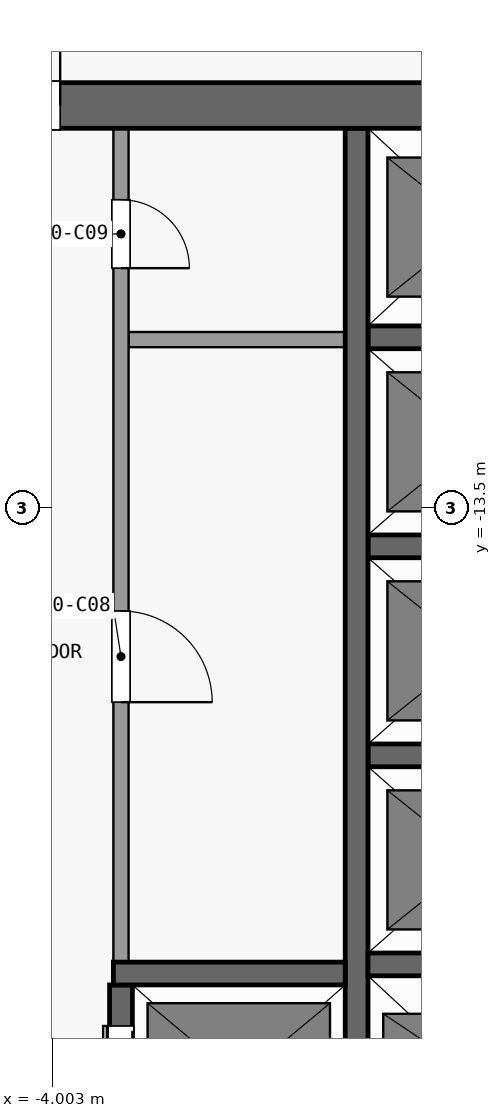
"""IFC4 building model, lengths in metres.
Left out: names, types, materials, properties, quantities, classifications, styles, units other than length and angle.
Written with IfcOpenShell. Run it as: python <this file> out.ifc"""

import sys

from ifc_helpers import new_model, si_unit, direction, frame, frame_2d, origin, place, context, subcontext, project, spatial, rectangle, extrude, element, fill, save


model = new_model("IFC4")
c1 = context("Model", 3, precision=1e-05, world=origin(), true_north=direction((0.0, 1.0)))
c2 = subcontext(c1, "Body", "Model", "MODEL_VIEW")
j1 = project(units=[si_unit("LENGTHUNIT", "METRE"), si_unit("PLANEANGLEUNIT", "RADIAN")], contexts=[c1])
p1 = place(None, origin())
s1 = spatial("IfcSite", under=j1, at=p1, CompositionType="ELEMENT")
p2 = place(p1, origin())
s2 = spatial("IfcBuilding", under=s1, at=p2, CompositionType="ELEMENT")
p3 = place(p2, frame((0.0, 0.0, 163.7)))
s3 = spatial("IfcBuildingStorey", under=s2, at=p3, CompositionType="ELEMENT", Elevation=163.7)
p4 = place(p3, frame((-13.3, -8.2, 0.0), z_axis=(0.0, 0.0, 1.0), x_axis=(1.0, 0.0, 0.0)))
e1 = element("IfcWall", 1, at=p4, inside=s3, PredefinedType="SHEAR", context=c2, shape_type="SweptSolid", body=[
    extrude(rectangle(XDim=26.6, YDim=0.6, at=frame_2d((13.3, 0.0))), origin(), (0.0, 0.0, 1.0), 3.3),
])
p5 = place(p4, frame((7.6, 0.0, 0.0)))
e2 = element("IfcOpeningElement", 2, at=p5, cuts=e1, PredefinedType="OPENING", context=c2, shape_type="SweptSolid", body=[
    extrude(rectangle(XDim=1.8, YDim=2.1, at=frame_2d((0.9, 1.05))), frame((0.0, 0.31, 0.0), z_axis=(0.0, -1.0, 0.0), x_axis=(1.0, 0.0, 0.0)), (0.0, 0.0, 1.0), 0.62),
])
p6 = place(p4, frame((17.2, 0.0, 0.0)))
e3 = element("IfcOpeningElement", 3, at=p6, cuts=e1, PredefinedType="OPENING", context=c2, shape_type="SweptSolid", body=[
    extrude(rectangle(XDim=1.8, YDim=2.1, at=frame_2d((0.9, 1.05))), frame((0.0, 0.31, 0.0), z_axis=(0.0, -1.0, 0.0), x_axis=(1.0, 0.0, 0.0)), (0.0, 0.0, 1.0), 0.62),
])
p7 = place(p4, frame((2.525, 0.0, 0.0)))
e4 = element("IfcOpeningElement", 4, at=p7, cuts=e1, PredefinedType="OPENING", context=c2, shape_type="SweptSolid", body=[
    extrude(rectangle(XDim=0.9, YDim=2.1, at=frame_2d((0.45, 1.05))), frame((0.0, 0.31, 0.0), z_axis=(0.0, -1.0, 0.0), x_axis=(1.0, 0.0, 0.0)), (0.0, 0.0, 1.0), 0.62),
])
p8 = place(p4, frame((23.875, 0.0, 0.0)))
e5 = element("IfcOpeningElement", 5, at=p8, cuts=e1, PredefinedType="OPENING", context=c2, shape_type="SweptSolid", body=[
    extrude(rectangle(XDim=1.2, YDim=2.1, at=frame_2d((0.6, 1.05))), frame((0.0, 0.31, 0.0), z_axis=(0.0, -1.0, 0.0), x_axis=(1.0, 0.0, 0.0)), (0.0, 0.0, 1.0), 0.62),
])
p9 = place(p3, frame((-3.2, -19.62, 0.0), z_axis=(0.0, 0.0, 1.0), x_axis=(1.0, 0.0, 0.0)))
e6 = element("IfcWall", 6, at=p9, inside=s3, PredefinedType="SHEAR", context=c2, shape_type="SweptSolid", body=[
    extrude(rectangle(XDim=3.05, YDim=0.3, at=frame_2d((1.525, 0.0))), origin(), (0.0, 0.0, 1.0), 3.3),
])
for number, where, z_axis, x_axis in (
    (7, (0.15, -19.5, 0.0), (0.0, 0.0, 1.0), (1.0, 0.0, 0.0)),
    (8, (0.15, -16.75, 0.0), (0.0, 0.0, 1.0), (1.0, 0.0, 0.0)),
    (9, (0.15, -14.0, 0.0), (0.0, 0.0, 1.0), (1.0, 0.0, 0.0)),
):
    element("IfcWall", number, at=place(p3, frame(where, z_axis=z_axis, x_axis=x_axis)), inside=s3, PredefinedType="SHEAR", context=c2, shape_type="SweptSolid", body=[
        extrude(rectangle(XDim=2.8, YDim=0.3, at=frame_2d((1.4, 0.0))), origin(), (0.0, 0.0, 1.0), 3.3),
    ])
p10 = place(p3, frame((-3.0, -11.28, 0.0), z_axis=(0.0, 0.0, 1.0), x_axis=(1.0, 0.0, 0.0)))
e10 = element("IfcWall", 10, at=p10, inside=s3, PredefinedType="PARTITIONING", context=c2, shape_type="SweptSolid", body=[
    extrude(rectangle(XDim=2.85, YDim=0.2, at=frame_2d((1.425, 0.0))), origin(), (0.0, 0.0, 1.0), 3.3),
])
p11 = place(p3, frame((0.15, -11.25, 0.0), z_axis=(0.0, 0.0, 1.0), x_axis=(1.0, 0.0, 0.0)))
e11 = element("IfcWall", 11, at=p11, inside=s3, PredefinedType="SHEAR", context=c2, shape_type="SweptSolid", body=[
    extrude(rectangle(XDim=2.8, YDim=0.3, at=frame_2d((1.4, 0.0))), origin(), (0.0, 0.0, 1.0), 3.3),
])
p12 = place(p3, frame((-3.1, -22.25, 0.0), z_axis=(0.0, 0.0, 1.0), x_axis=(0.0, 1.0, 0.0)))
e12 = element("IfcWall", 12, at=p12, inside=s3, PredefinedType="SHEAR", context=c2, shape_type="SweptSolid", body=[
    extrude(rectangle(XDim=2.48, YDim=0.3, at=frame_2d((1.24, 0.0))), origin(), (0.0, 0.0, 1.0), 3.3),
])
p13 = place(p12, frame((0.54, 0.0, 0.0)))
e13 = element("IfcOpeningElement", 13, at=p13, cuts=e12, PredefinedType="OPENING", context=c2, shape_type="SweptSolid", body=[
    extrude(rectangle(XDim=1.4, YDim=2.1, at=frame_2d((0.7, 1.05))), frame((0.0, 0.16, 0.0), z_axis=(0.0, -1.0, 0.0), x_axis=(1.0, 0.0, 0.0)), (0.0, 0.0, 1.0), 0.32),
])
p14 = place(p3, frame((-3.1, -8.5, 0.0), z_axis=(0.0, 0.0, 1.0), x_axis=(0.0, -1.0, 0.0)))
e14 = element("IfcWall", 14, at=p14, inside=s3, PredefinedType="PARTITIONING", context=c2, shape_type="SweptSolid", body=[
    extrude(rectangle(XDim=10.97, YDim=0.2, at=frame_2d((5.485, 0.0))), origin(), (0.0, 0.0, 1.0), 3.3),
])
p15 = place(p14, frame((6.35, 0.0, 0.0)))
e15 = element("IfcOpeningElement", 15, at=p15, cuts=e14, PredefinedType="OPENING", context=c2, shape_type="SweptSolid", body=[
    extrude(rectangle(XDim=1.2, YDim=2.1, at=frame_2d((0.6, 1.05))), frame((0.0, 0.11, 0.0), z_axis=(0.0, -1.0, 0.0), x_axis=(1.0, 0.0, 0.0)), (0.0, 0.0, 1.0), 0.22),
])
p16 = place(p14, frame((0.94, 0.0, 0.0)))
e16 = element("IfcOpeningElement", 16, at=p16, cuts=e14, PredefinedType="OPENING", context=c2, shape_type="SweptSolid", body=[
    extrude(rectangle(XDim=0.9, YDim=2.1, at=frame_2d((0.45, 1.05))), frame((0.0, 0.11, 0.0), z_axis=(0.0, -1.0, 0.0), x_axis=(1.0, 0.0, 0.0)), (0.0, 0.0, 1.0), 0.22),
])
p17 = place(p3, frame((0.0, -22.25, 0.0), z_axis=(0.0, 0.0, 1.0), x_axis=(0.0, 1.0, 0.0)))
e17 = element("IfcWall", 17, at=p17, inside=s3, PredefinedType="SHEAR", context=c2, shape_type="SweptSolid", body=[
    extrude(rectangle(XDim=13.75, YDim=0.3, at=frame_2d((6.875, 0.0))), origin(), (0.0, 0.0, 1.0), 3.3),
])
p18 = place(p13, origin())
e18 = element("IfcDoor", 18, at=p18, inside=s3, OperationType="DOUBLE_DOOR_SLIDING", PredefinedType="DOOR", context=c2, shape_type="SweptSolid", body=[
    extrude(rectangle(XDim=1.4, YDim=2.1, at=frame_2d((0.7, 1.05))), frame((0.0, 0.025, 0.0), z_axis=(0.0, -1.0, 0.0), x_axis=(1.0, 0.0, 0.0)), (0.0, 0.0, 1.0), 0.05),
])
fill(e13, e18)
p19 = place(p5, origin())
e19 = element("IfcDoor", 19, at=p19, inside=s3, OperationType="DOUBLE_DOOR_SINGLE_SWING", PredefinedType="DOOR", context=c2, shape_type="SweptSolid", body=[
    extrude(rectangle(XDim=1.8, YDim=2.1, at=frame_2d((0.9, 1.05))), frame((0.0, 0.025, 0.0), z_axis=(0.0, -1.0, 0.0), x_axis=(1.0, 0.0, 0.0)), (0.0, 0.0, 1.0), 0.05),
])
fill(e2, e19)
p20 = place(p15, origin())
e20 = element("IfcDoor", 20, at=p20, inside=s3, OperationType="SINGLE_SWING_RIGHT", PredefinedType="DOOR", context=c2, shape_type="SweptSolid", body=[
    extrude(rectangle(XDim=1.2, YDim=2.1, at=frame_2d((0.6, 1.05))), frame((0.0, 0.025, 0.0), z_axis=(0.0, -1.0, 0.0), x_axis=(1.0, 0.0, 0.0)), (0.0, 0.0, 1.0), 0.05),
])
fill(e15, e20)
p21 = place(p16, origin())
e21 = element("IfcDoor", 21, at=p21, inside=s3, OperationType="SINGLE_SWING_RIGHT", PredefinedType="DOOR", context=c2, shape_type="SweptSolid", body=[
    extrude(rectangle(XDim=0.9, YDim=2.1, at=frame_2d((0.45, 1.05))), frame((0.0, 0.025, 0.0), z_axis=(0.0, -1.0, 0.0), x_axis=(1.0, 0.0, 0.0)), (0.0, 0.0, 1.0), 0.05),
])
fill(e16, e21)
save(model, sys.argv[1])
